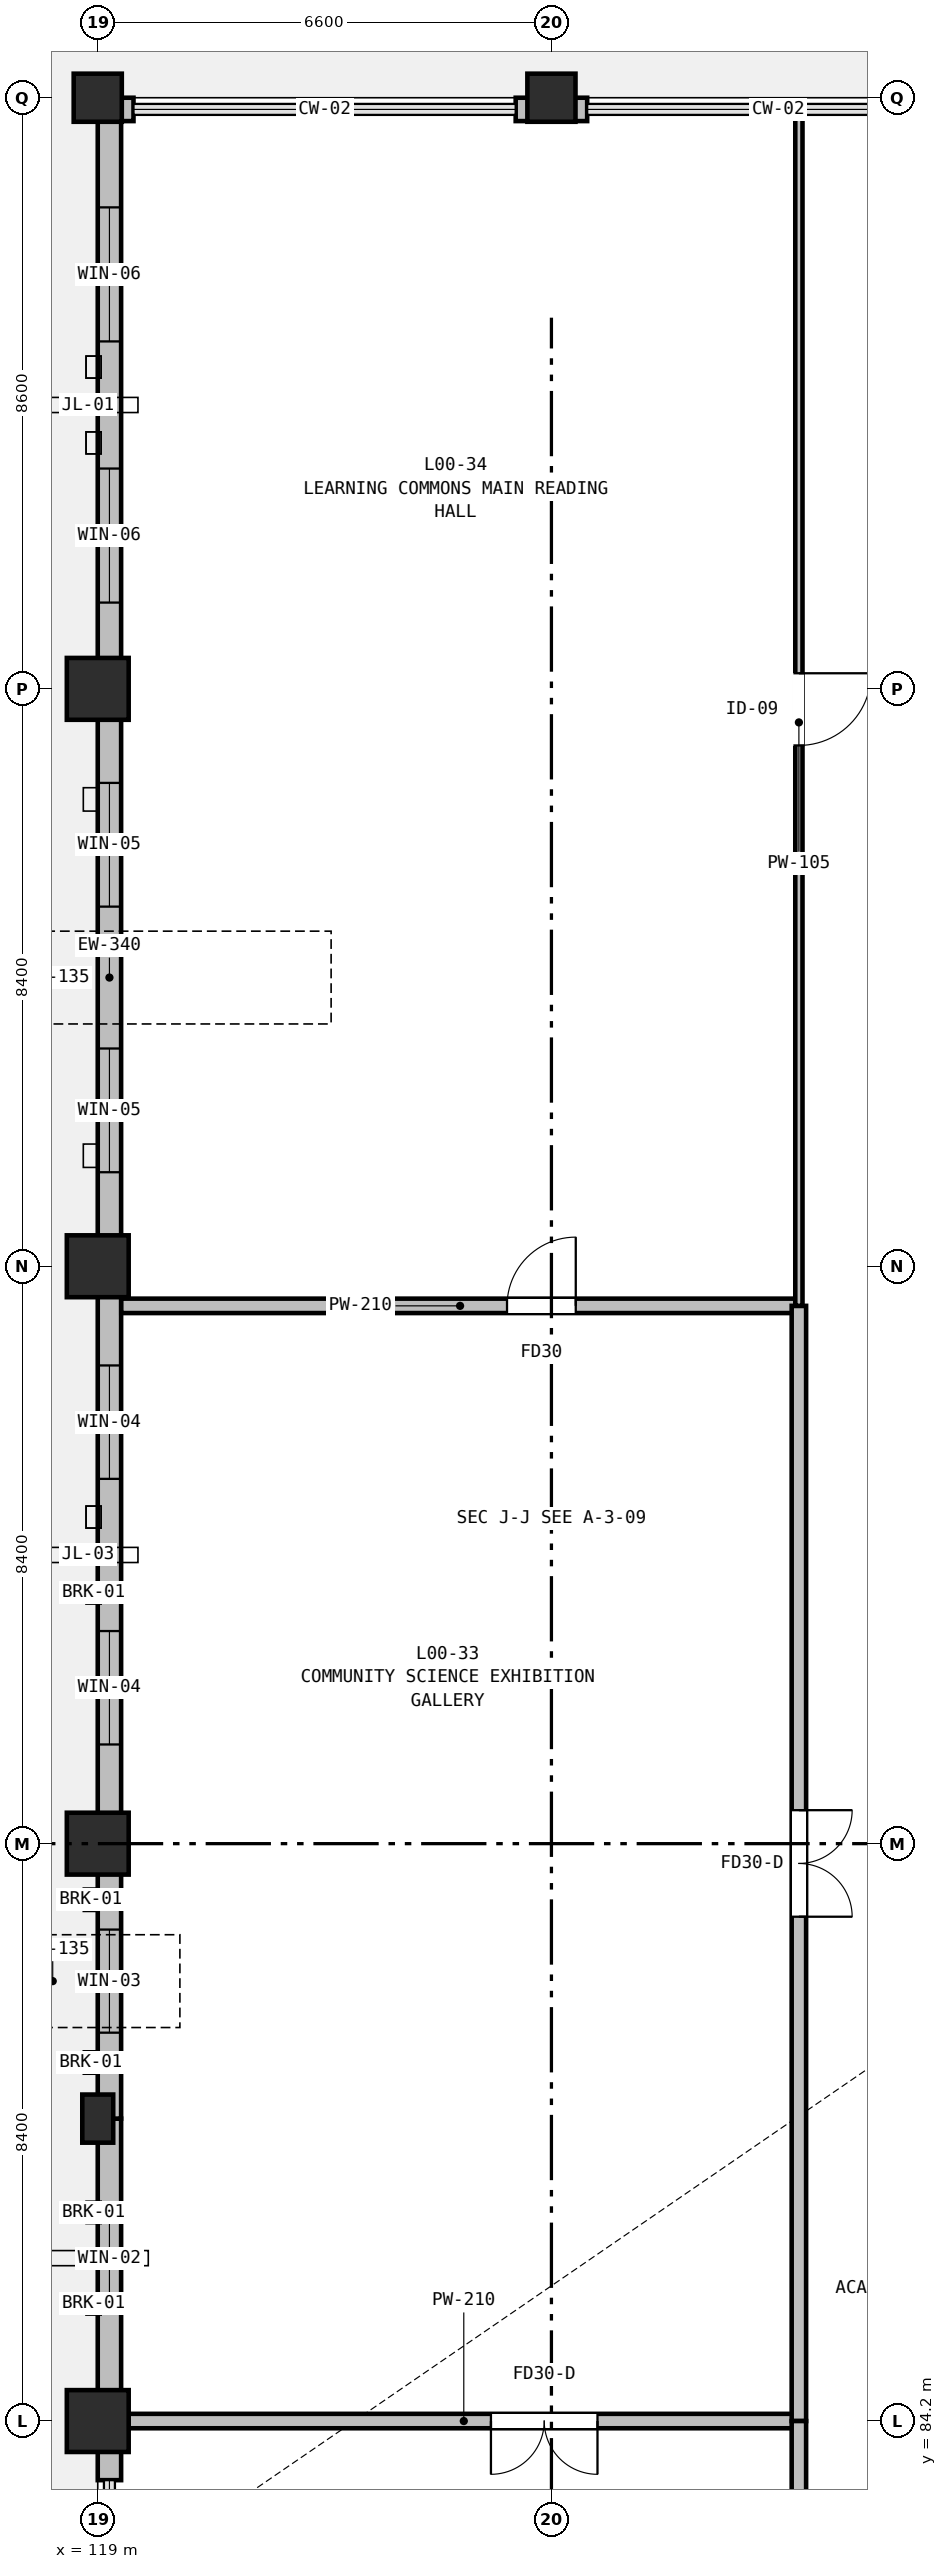
"""IFC4 building model, lengths in metres.
Left out: names, types, materials, properties, quantities, classifications, styles, units other than length and angle.
Written with IfcOpenShell. Run it as: python <this file> out.ifc"""

import sys

from ifc_helpers import new_model, si_unit, direction, frame, frame_2d, origin, origin_2d, place, context, subcontext, project, spatial, rectangle, extrude, element, fill, save


model = new_model("IFC4")
c1 = context("Model", 3, precision=1e-05, world=origin(), true_north=direction((0.0, 1.0)))
c2 = subcontext(c1, "Body", "Model", "MODEL_VIEW")
j1 = project(units=[si_unit("LENGTHUNIT", "METRE"), si_unit("PLANEANGLEUNIT", "RADIAN")], contexts=[c1])
p1 = place(None, origin())
s1 = spatial("IfcSite", under=j1, at=p1, CompositionType="ELEMENT")
p2 = place(p1, origin())
s2 = spatial("IfcBuilding", under=s1, at=p2, CompositionType="ELEMENT")
p3 = place(p2, origin())
s3 = spatial("IfcBuildingStorey", under=s2, at=p3, CompositionType="ELEMENT", Elevation=0.0)
for number, where, z_axis, x_axis in (
    (1, (119.0, 84.2, -0.32), (0.0, 0.0, 1.0), (1.0, 0.0, 0.0)),
    (2, (119.0, 92.6, -0.32), (0.0, 0.0, 1.0), (1.0, 0.0, 0.0)),
    (3, (119.0, 101.0, -0.32), (0.0, 0.0, 1.0), (1.0, 0.0, 0.0)),
    (4, (119.0, 109.4, -0.32), (0.0, 0.0, 1.0), (1.0, 0.0, 0.0)),
):
    element("IfcColumn", number, at=place(p3, frame(where, z_axis=z_axis, x_axis=x_axis)), inside=s3, PredefinedType="COLUMN", context=c2, shape_type="SweptSolid", body=[
        extrude(rectangle(XDim=0.9, YDim=0.9, at=origin_2d()), origin(), (0.0, 0.0, 1.0), 5.72),
    ])
for number, where, z_axis, x_axis in (
    (5, (119.0, 118.0, -0.32), (0.0, 0.0, 1.0), (1.0, 0.0, 0.0)),
    (6, (125.6, 118.0, -0.32), (0.0, 0.0, 1.0), (1.0, 0.0, 0.0)),
):
    element("IfcColumn", number, at=place(p3, frame(where, z_axis=z_axis, x_axis=x_axis)), inside=s3, PredefinedType="COLUMN", context=c2, shape_type="SweptSolid", body=[
        extrude(rectangle(XDim=0.7, YDim=0.7, at=origin_2d()), origin(), (0.0, 0.0, 1.0), 5.66),
    ])
p4 = place(p3, frame((119.0, 88.6, -0.32), z_axis=(0.0, 0.0, 1.0), x_axis=(1.0, 0.0, 0.0)))
e7 = element("IfcColumn", 7, at=p4, inside=s3, PredefinedType="PILASTER", context=c2, shape_type="SweptSolid", body=[
    extrude(rectangle(XDim=0.45, YDim=0.7, at=origin_2d()), origin(), (0.0, 0.0, 1.0), 5.66),
])
p5 = place(p3, frame((119.17, 83.34, 0.0), z_axis=(0.0, 0.0, 1.0), x_axis=(0.0, 1.0, 0.0)))
e8 = element("IfcWall", 8, at=p5, inside=s3, PredefinedType="STANDARD", context=c2, shape_type="SweptSolid", body=[
    extrude(rectangle(XDim=0.52, YDim=0.34, at=frame_2d((0.26, 0.0))), origin(), (0.0, 0.0, 1.0), 4.435),
])
p6 = place(p3, frame((119.17, 84.54, 0.0), z_axis=(0.0, 0.0, 1.0), x_axis=(0.0, 1.0, 0.0)))
e9 = element("IfcWall", 9, at=p6, inside=s3, PredefinedType="STANDARD", context=c2, shape_type="SweptSolid", body=[
    extrude(rectangle(XDim=4.06, YDim=0.34, at=frame_2d((2.03, 0.0))), origin(), (0.0, 0.0, 1.0), 4.435),
])
p7 = place(p6, frame((1.355, 0.0, 0.9)))
e10 = element("IfcOpeningElement", 10, at=p7, cuts=e9, PredefinedType="OPENING", context=c2, shape_type="SweptSolid", body=[
    extrude(rectangle(XDim=1.35, YDim=2.1, at=frame_2d((0.675, 1.05))), frame((0.0, 0.18, 0.0), z_axis=(0.0, -1.0, 0.0), x_axis=(1.0, 0.0, 0.0)), (0.0, 0.0, 1.0), 0.36),
])
p8 = place(p3, frame((119.17, 88.6, 0.0), z_axis=(0.0, 0.0, 1.0), x_axis=(0.0, 1.0, 0.0)))
e11 = element("IfcWall", 11, at=p8, inside=s3, PredefinedType="STANDARD", context=c2, shape_type="SweptSolid", body=[
    extrude(rectangle(XDim=4.0, YDim=0.34, at=frame_2d((2.0, 0.0))), origin(), (0.0, 0.0, 1.0), 4.435),
])
p9 = place(p8, frame((1.25, 0.0, 0.9)))
e12 = element("IfcOpeningElement", 12, at=p9, cuts=e11, PredefinedType="OPENING", context=c2, shape_type="SweptSolid", body=[
    extrude(rectangle(XDim=1.5, YDim=2.1, at=frame_2d((0.75, 1.05))), frame((0.0, 0.18, 0.0), z_axis=(0.0, -1.0, 0.0), x_axis=(1.0, 0.0, 0.0)), (0.0, 0.0, 1.0), 0.36),
])
p10 = place(p3, frame((119.17, 92.6, 0.0), z_axis=(0.0, 0.0, 1.0), x_axis=(0.0, 1.0, 0.0)))
e13 = element("IfcWall", 13, at=p10, inside=s3, PredefinedType="STANDARD", context=c2, shape_type="SweptSolid", body=[
    extrude(rectangle(XDim=8.4, YDim=0.34, at=frame_2d((4.2, 0.0))), origin(), (0.0, 0.0, 1.0), 4.435),
])
p11 = place(p10, frame((1.443, 0.0, 0.9)))
e14 = element("IfcOpeningElement", 14, at=p11, cuts=e13, PredefinedType="OPENING", context=c2, shape_type="SweptSolid", body=[
    extrude(rectangle(XDim=1.65, YDim=2.1, at=frame_2d((0.825, 1.05))), frame((0.0, 0.18, 0.0), z_axis=(0.0, -1.0, 0.0), x_axis=(1.0, 0.0, 0.0)), (0.0, 0.0, 1.0), 0.36),
])
p12 = place(p10, frame((5.307, 0.0, 0.9)))
e15 = element("IfcOpeningElement", 15, at=p12, cuts=e13, PredefinedType="OPENING", context=c2, shape_type="SweptSolid", body=[
    extrude(rectangle(XDim=1.65, YDim=2.1, at=frame_2d((0.825, 1.05))), frame((0.0, 0.18, 0.0), z_axis=(0.0, -1.0, 0.0), x_axis=(1.0, 0.0, 0.0)), (0.0, 0.0, 1.0), 0.36),
])
p13 = place(p3, frame((119.17, 101.0, 0.0), z_axis=(0.0, 0.0, 1.0), x_axis=(0.0, 1.0, 0.0)))
e16 = element("IfcWall", 16, at=p13, inside=s3, PredefinedType="STANDARD", context=c2, shape_type="SweptSolid", body=[
    extrude(rectangle(XDim=8.4, YDim=0.34, at=frame_2d((4.2, 0.0))), origin(), (0.0, 0.0, 1.0), 4.435),
])
p14 = place(p13, frame((1.368, 0.0, 0.9)))
e17 = element("IfcOpeningElement", 17, at=p14, cuts=e16, PredefinedType="OPENING", context=c2, shape_type="SweptSolid", body=[
    extrude(rectangle(XDim=1.8, YDim=2.1, at=frame_2d((0.9, 1.05))), frame((0.0, 0.18, 0.0), z_axis=(0.0, -1.0, 0.0), x_axis=(1.0, 0.0, 0.0)), (0.0, 0.0, 1.0), 0.36),
])
p15 = place(p13, frame((5.232, 0.0, 0.9)))
e18 = element("IfcOpeningElement", 18, at=p15, cuts=e16, PredefinedType="OPENING", context=c2, shape_type="SweptSolid", body=[
    extrude(rectangle(XDim=1.8, YDim=2.1, at=frame_2d((0.9, 1.05))), frame((0.0, 0.18, 0.0), z_axis=(0.0, -1.0, 0.0), x_axis=(1.0, 0.0, 0.0)), (0.0, 0.0, 1.0), 0.36),
])
p16 = place(p3, frame((119.17, 109.4, 0.0), z_axis=(0.0, 0.0, 1.0), x_axis=(0.0, 1.0, 0.0)))
e19 = element("IfcWall", 19, at=p16, inside=s3, PredefinedType="STANDARD", context=c2, shape_type="SweptSolid", body=[
    extrude(rectangle(XDim=8.26, YDim=0.34, at=frame_2d((4.13, 0.0))), origin(), (0.0, 0.0, 1.0), 4.435),
])
p17 = place(p16, frame((1.255, 0.0, 0.9)))
e20 = element("IfcOpeningElement", 20, at=p17, cuts=e19, PredefinedType="OPENING", context=c2, shape_type="SweptSolid", body=[
    extrude(rectangle(XDim=1.95, YDim=2.1, at=frame_2d((0.975, 1.05))), frame((0.0, 0.18, 0.0), z_axis=(0.0, -1.0, 0.0), x_axis=(1.0, 0.0, 0.0)), (0.0, 0.0, 1.0), 0.36),
])
p18 = place(p16, frame((5.055, 0.0, 0.9)))
e21 = element("IfcOpeningElement", 21, at=p18, cuts=e19, PredefinedType="OPENING", context=c2, shape_type="SweptSolid", body=[
    extrude(rectangle(XDim=1.95, YDim=2.1, at=frame_2d((0.975, 1.05))), frame((0.0, 0.18, 0.0), z_axis=(0.0, -1.0, 0.0), x_axis=(1.0, 0.0, 0.0)), (0.0, 0.0, 1.0), 0.36),
])
for number, where, z_axis, x_axis in (
    (22, (119.0, 117.83, 0.0), (0.0, 0.0, 1.0), (1.0, 0.0, 0.0)),
    (23, (125.08, 117.83, 0.0), (0.0, 0.0, 1.0), (1.0, 0.0, 0.0)),
    (24, (125.6, 117.83, 0.0), (0.0, 0.0, 1.0), (1.0, 0.0, 0.0)),
):
    element("IfcWall", number, at=place(p3, frame(where, z_axis=z_axis, x_axis=x_axis)), inside=s3, PredefinedType="STANDARD", context=c2, shape_type="SweptSolid", body=[
        extrude(rectangle(XDim=0.52, YDim=0.34, at=frame_2d((0.26, 0.0))), origin(), (0.0, 0.0, 1.0), 4.535),
    ])
p19 = place(p3, frame((129.2, 84.2, 0.0), z_axis=(0.0, 0.0, 1.0), x_axis=(-1.0, 0.0, 0.0)))
e25 = element("IfcWall", 25, at=p19, inside=s3, PredefinedType="PARTITIONING", context=c2, shape_type="SweptSolid", body=[
    extrude(rectangle(XDim=9.75, YDim=0.21, at=frame_2d((4.875, 0.0))), origin(), (0.0, 0.0, 1.0), 4.435),
])
p20 = place(p19, frame((2.93, 0.0, 0.0)))
e26 = element("IfcOpeningElement", 26, at=p20, cuts=e25, PredefinedType="OPENING", context=c2, shape_type="SweptSolid", body=[
    extrude(rectangle(XDim=1.55, YDim=2.2, at=frame_2d((0.775, 1.1))), frame((0.0, 0.115, 0.0), z_axis=(0.0, -1.0, 0.0), x_axis=(1.0, 0.0, 0.0)), (0.0, 0.0, 1.0), 0.23),
])
p21 = place(p3, frame((119.342, 100.424, 0.0), z_axis=(0.0, 0.0, 1.0), x_axis=(1.0, 0.0, 0.0)))
e27 = element("IfcWall", 27, at=p21, inside=s3, PredefinedType="PARTITIONING", context=c2, shape_type="SweptSolid", body=[
    extrude(rectangle(XDim=9.858, YDim=0.21, at=frame_2d((4.929, 0.0))), origin(), (0.0, 0.0, 1.0), 4.535),
])
p22 = place(p21, frame((5.612, 0.0, 0.0)))
e28 = element("IfcOpeningElement", 28, at=p22, cuts=e27, PredefinedType="OPENING", context=c2, shape_type="SweptSolid", body=[
    extrude(rectangle(XDim=1.0, YDim=2.1, at=frame_2d((0.5, 1.05))), frame((0.0, 0.115, 0.0), z_axis=(0.0, -1.0, 0.0), x_axis=(1.0, 0.0, 0.0)), (0.0, 0.0, 1.0), 0.23),
])
p23 = place(p3, frame((129.2, 100.424, 0.0), z_axis=(0.0, 0.0, 1.0), x_axis=(0.0, -1.0, 0.0)))
e29 = element("IfcWall", 29, at=p23, inside=s3, PredefinedType="PARTITIONING", context=c2, shape_type="SweptSolid", body=[
    extrude(rectangle(XDim=16.224, YDim=0.21, at=frame_2d((8.112, 0.0))), origin(), (0.0, 0.0, 1.0), 4.435),
])
p24 = place(p23, frame((7.337, 0.0, 0.0)))
e30 = element("IfcOpeningElement", 30, at=p24, cuts=e29, PredefinedType="OPENING", context=c2, shape_type="SweptSolid", body=[
    extrude(rectangle(XDim=1.55, YDim=2.2, at=frame_2d((0.775, 1.1))), frame((0.0, 0.115, 0.0), z_axis=(0.0, -1.0, 0.0), x_axis=(1.0, 0.0, 0.0)), (0.0, 0.0, 1.0), 0.23),
])
p25 = place(p3, frame((129.2, 84.2, 0.0), z_axis=(0.0, 0.0, 1.0), x_axis=(0.0, -1.0, 0.0)))
e31 = element("IfcWall", 31, at=p25, inside=s3, PredefinedType="PARTITIONING", context=c2, shape_type="SweptSolid", body=[
    extrude(rectangle(XDim=8.8, YDim=0.21, at=frame_2d((4.4, 0.0))), origin(), (0.0, 0.0, 1.0), 4.435),
])
p26 = place(p3, frame((129.2, 117.78, 0.0), z_axis=(0.0, 0.0, 1.0), x_axis=(0.0, -1.0, 0.0)))
e32 = element("IfcWall", 32, at=p26, inside=s3, PredefinedType="PARTITIONING", context=c2, shape_type="SweptSolid", body=[
    extrude(rectangle(XDim=17.356, YDim=0.105, at=frame_2d((8.678, 0.0))), origin(), (0.0, 0.0, 1.0), 4.435),
])
p27 = place(p26, frame((8.153, 0.0, 0.0)))
e33 = element("IfcOpeningElement", 33, at=p27, cuts=e32, PredefinedType="OPENING", context=c2, shape_type="SweptSolid", body=[
    extrude(rectangle(XDim=1.05, YDim=2.06, at=frame_2d((0.525, 1.03))), frame((0.0, 0.062, 0.0), z_axis=(0.0, -1.0, 0.0), x_axis=(1.0, 0.0, 0.0)), (0.0, 0.0, 1.0), 0.125),
])
p28 = place(p7, origin())
e34 = element("IfcWindow", 34, at=p28, inside=s3, PartitioningType="SINGLE_PANEL", PredefinedType="WINDOW", context=c2, shape_type="SweptSolid", body=[
    extrude(rectangle(XDim=1.35, YDim=2.1, at=frame_2d((0.675, 1.05))), frame((0.0, 0.03, 0.0), z_axis=(0.0, -1.0, 0.0), x_axis=(1.0, 0.0, 0.0)), (0.0, 0.0, 1.0), 0.06),
])
fill(e10, e34)
p29 = place(p9, origin())
e35 = element("IfcWindow", 35, at=p29, inside=s3, PartitioningType="SINGLE_PANEL", PredefinedType="WINDOW", context=c2, shape_type="SweptSolid", body=[
    extrude(rectangle(XDim=1.5, YDim=2.1, at=frame_2d((0.75, 1.05))), frame((0.0, 0.03, 0.0), z_axis=(0.0, -1.0, 0.0), x_axis=(1.0, 0.0, 0.0)), (0.0, 0.0, 1.0), 0.06),
])
fill(e12, e35)
p30 = place(p11, origin())
e36 = element("IfcWindow", 36, at=p30, inside=s3, PartitioningType="SINGLE_PANEL", PredefinedType="WINDOW", context=c2, shape_type="SweptSolid", body=[
    extrude(rectangle(XDim=1.65, YDim=2.1, at=frame_2d((0.825, 1.05))), frame((0.0, 0.03, 0.0), z_axis=(0.0, -1.0, 0.0), x_axis=(1.0, 0.0, 0.0)), (0.0, 0.0, 1.0), 0.06),
])
fill(e14, e36)
p31 = place(p12, origin())
e37 = element("IfcWindow", 37, at=p31, inside=s3, PartitioningType="SINGLE_PANEL", PredefinedType="WINDOW", context=c2, shape_type="SweptSolid", body=[
    extrude(rectangle(XDim=1.65, YDim=2.1, at=frame_2d((0.825, 1.05))), frame((0.0, 0.03, 0.0), z_axis=(0.0, -1.0, 0.0), x_axis=(1.0, 0.0, 0.0)), (0.0, 0.0, 1.0), 0.06),
])
fill(e15, e37)
p32 = place(p14, origin())
e38 = element("IfcWindow", 38, at=p32, inside=s3, PartitioningType="SINGLE_PANEL", PredefinedType="WINDOW", context=c2, shape_type="SweptSolid", body=[
    extrude(rectangle(XDim=1.8, YDim=2.1, at=frame_2d((0.9, 1.05))), frame((0.0, 0.03, 0.0), z_axis=(0.0, -1.0, 0.0), x_axis=(1.0, 0.0, 0.0)), (0.0, 0.0, 1.0), 0.06),
])
fill(e17, e38)
p33 = place(p15, origin())
e39 = element("IfcWindow", 39, at=p33, inside=s3, PartitioningType="SINGLE_PANEL", PredefinedType="WINDOW", context=c2, shape_type="SweptSolid", body=[
    extrude(rectangle(XDim=1.8, YDim=2.1, at=frame_2d((0.9, 1.05))), frame((0.0, 0.03, 0.0), z_axis=(0.0, -1.0, 0.0), x_axis=(1.0, 0.0, 0.0)), (0.0, 0.0, 1.0), 0.06),
])
fill(e18, e39)
p34 = place(p17, origin())
e40 = element("IfcWindow", 40, at=p34, inside=s3, PartitioningType="SINGLE_PANEL", PredefinedType="WINDOW", context=c2, shape_type="SweptSolid", body=[
    extrude(rectangle(XDim=1.95, YDim=2.1, at=frame_2d((0.975, 1.05))), frame((0.0, 0.03, 0.0), z_axis=(0.0, -1.0, 0.0), x_axis=(1.0, 0.0, 0.0)), (0.0, 0.0, 1.0), 0.06),
])
fill(e20, e40)
p35 = place(p18, origin())
e41 = element("IfcWindow", 41, at=p35, inside=s3, PartitioningType="SINGLE_PANEL", PredefinedType="WINDOW", context=c2, shape_type="SweptSolid", body=[
    extrude(rectangle(XDim=1.95, YDim=2.1, at=frame_2d((0.975, 1.05))), frame((0.0, 0.03, 0.0), z_axis=(0.0, -1.0, 0.0), x_axis=(1.0, 0.0, 0.0)), (0.0, 0.0, 1.0), 0.06),
])
fill(e21, e41)
p36 = place(p24, origin())
e42 = element("IfcDoor", 42, at=p36, inside=s3, OperationType="DOUBLE_DOOR_SINGLE_SWING", PredefinedType="DOOR", context=c2, shape_type="SweptSolid", body=[
    extrude(rectangle(XDim=1.55, YDim=2.2, at=frame_2d((0.775, 1.1))), frame((0.0, 0.025, 0.0), z_axis=(0.0, -1.0, 0.0), x_axis=(1.0, 0.0, 0.0)), (0.0, 0.0, 1.0), 0.05),
])
fill(e30, e42)
p37 = place(p20, origin())
e43 = element("IfcDoor", 43, at=p37, inside=s3, OperationType="DOUBLE_DOOR_SINGLE_SWING", PredefinedType="DOOR", context=c2, shape_type="SweptSolid", body=[
    extrude(rectangle(XDim=1.55, YDim=2.2, at=frame_2d((0.775, 1.1))), frame((0.0, 0.025, 0.0), z_axis=(0.0, -1.0, 0.0), x_axis=(1.0, 0.0, 0.0)), (0.0, 0.0, 1.0), 0.05),
])
fill(e26, e43)
p38 = place(p27, origin())
e44 = element("IfcDoor", 44, at=p38, inside=s3, OperationType="SINGLE_SWING_LEFT", PredefinedType="DOOR", context=c2, shape_type="SweptSolid", body=[
    extrude(rectangle(XDim=1.05, YDim=2.06, at=frame_2d((0.525, 1.03))), frame((0.0, 0.025, 0.0), z_axis=(0.0, -1.0, 0.0), x_axis=(1.0, 0.0, 0.0)), (0.0, 0.0, 1.0), 0.05),
])
fill(e33, e44)
p39 = place(p22, origin())
e45 = element("IfcDoor", 45, at=p39, inside=s3, OperationType="SINGLE_SWING_RIGHT", PredefinedType="DOOR", context=c2, shape_type="SweptSolid", body=[
    extrude(rectangle(XDim=1.0, YDim=2.1, at=frame_2d((0.5, 1.05))), frame((0.0, 0.025, 0.0), z_axis=(0.0, -1.0, 0.0), x_axis=(1.0, 0.0, 0.0)), (0.0, 0.0, 1.0), 0.05),
])
fill(e28, e45)
save(model, sys.argv[1])
